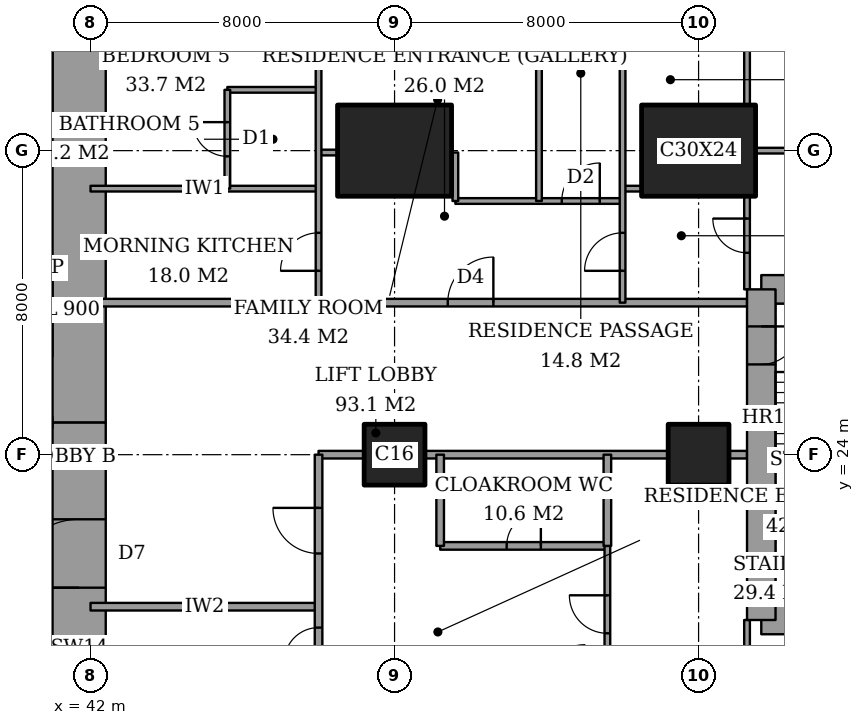
"""IFC4 building model, lengths in metres.
Left out: names, types, materials, properties, quantities, classifications, styles, units other than length and angle.
Written with IfcOpenShell. Run it as: python <this file> out.ifc"""

import sys

from ifc_helpers import new_model, si_unit, direction, frame, frame_2d, origin, origin_2d, place, context, subcontext, project, spatial, rectangle, extrude, element, fill, save


model = new_model("IFC4")
c1 = context("Model", 3, precision=1e-05, world=origin(), true_north=direction((0.0, 1.0)))
c2 = subcontext(c1, "Body", "Model", "MODEL_VIEW")
j1 = project(units=[si_unit("LENGTHUNIT", "METRE"), si_unit("PLANEANGLEUNIT", "RADIAN")], contexts=[c1])
p1 = place(None, origin())
s1 = spatial("IfcSite", under=j1, at=p1, CompositionType="ELEMENT")
p2 = place(p1, origin())
s2 = spatial("IfcBuilding", under=s1, at=p2, CompositionType="ELEMENT")
p3 = place(p2, frame((0.0, 0.0, 255.6)))
s3 = spatial("IfcBuildingStorey", under=s2, at=p3, CompositionType="ELEMENT", Elevation=255.6)
p4 = place(p3, frame((50.0, 24.0, 0.0), z_axis=(0.0, 0.0, 1.0), x_axis=(1.0, 0.0, 0.0)))
e1 = element("IfcColumn", 1, at=p4, inside=s3, PredefinedType="COLUMN", context=c2, shape_type="SweptSolid", body=[
    extrude(rectangle(XDim=1.6, YDim=1.6, at=origin_2d()), origin(), (0.0, 0.0, 1.0), 3.6),
])
p5 = place(p3, frame((50.0, 32.0, 0.0), z_axis=(0.0, 0.0, 1.0), x_axis=(1.0, 0.0, 0.0)))
e2 = element("IfcColumn", 2, at=p5, inside=s3, PredefinedType="COLUMN", context=c2, shape_type="SweptSolid", body=[
    extrude(rectangle(XDim=3.0, YDim=2.4, at=origin_2d()), origin(), (0.0, 0.0, 1.0), 3.6),
])
p6 = place(p3, frame((58.0, 24.0, 0.0), z_axis=(0.0, 0.0, 1.0), x_axis=(1.0, 0.0, 0.0)))
e3 = element("IfcColumn", 3, at=p6, inside=s3, PredefinedType="COLUMN", context=c2, shape_type="SweptSolid", body=[
    extrude(rectangle(XDim=1.6, YDim=1.6, at=origin_2d()), origin(), (0.0, 0.0, 1.0), 3.6),
])
p7 = place(p3, frame((58.0, 32.0, 0.0), z_axis=(0.0, 0.0, 1.0), x_axis=(1.0, 0.0, 0.0)))
e4 = element("IfcColumn", 4, at=p7, inside=s3, PredefinedType="COLUMN", context=c2, shape_type="SweptSolid", body=[
    extrude(rectangle(XDim=3.0, YDim=2.4, at=origin_2d()), origin(), (0.0, 0.0, 1.0), 3.6),
])
p8 = place(p3, frame((41.7, 13.0, 0.0), z_axis=(0.0, 0.0, 1.0), x_axis=(0.0, 1.0, 0.0)))
e5 = element("IfcWall", 5, at=p8, inside=s3, PredefinedType="SHEAR", context=c2, shape_type="SweptSolid", body=[
    extrude(rectangle(XDim=11.85, YDim=1.4, at=frame_2d((5.925, 0.0))), origin(), (0.0, 0.0, 1.0), 3.6),
])
p9 = place(p8, frame((7.5, 0.0, 0.0)))
e6 = element("IfcOpeningElement", 6, at=p9, cuts=e5, PredefinedType="OPENING", context=c2, shape_type="SweptSolid", body=[
    extrude(rectangle(XDim=1.8, YDim=2.4, at=frame_2d((0.9, 1.2))), frame((0.0, 0.71, 0.0), z_axis=(0.0, -1.0, 0.0), x_axis=(1.0, 0.0, 0.0)), (0.0, 0.0, 1.0), 1.42),
])
p10 = place(p3, frame((41.7, 24.85, 0.0), z_axis=(0.0, 0.0, 1.0), x_axis=(0.0, 1.0, 0.0)))
e7 = element("IfcWall", 7, at=p10, inside=s3, PredefinedType="SHEAR", context=c2, shape_type="SweptSolid", body=[
    extrude(rectangle(XDim=10.15, YDim=1.4, at=frame_2d((5.075, 0.0))), origin(), (0.0, 0.0, 1.0), 3.6),
])
for number, where, z_axis, x_axis in (
    (8, (59.65, 19.65, 0.0), (0.0, 0.0, 1.0), (1.0, 0.0, 0.0)),
    (9, (64.1, 28.35, 0.0), (0.0, 0.0, 1.0), (-1.0, 0.0, 0.0)),
):
    element("IfcWall", number, at=place(p3, frame(where, z_axis=z_axis, x_axis=x_axis)), inside=s3, PredefinedType="SHEAR", context=c2, shape_type="SweptSolid", body=[
        extrude(rectangle(XDim=4.45, YDim=0.75, at=frame_2d((2.225, 0.0))), origin(), (0.0, 0.0, 1.0), 3.6),
    ])
p11 = place(p3, frame((59.65, 28.35, 0.0), z_axis=(0.0, 0.0, 1.0), x_axis=(0.0, -1.0, 0.0)))
e10 = element("IfcWall", 10, at=p11, inside=s3, PredefinedType="SHEAR", context=c2, shape_type="SweptSolid", body=[
    extrude(rectangle(XDim=8.7, YDim=0.75, at=frame_2d((4.35, 0.0))), origin(), (0.0, 0.0, 1.0), 3.6),
])
p12 = place(p11, frame((0.975, 0.0, 0.0)))
e11 = element("IfcOpeningElement", 11, at=p12, cuts=e10, PredefinedType="OPENING", context=c2, shape_type="SweptSolid", body=[
    extrude(rectangle(XDim=1.0, YDim=2.1, at=frame_2d((0.5, 1.05))), frame((0.0, 0.385, 0.0), z_axis=(0.0, -1.0, 0.0), x_axis=(1.0, 0.0, 0.0)), (0.0, 0.0, 1.0), 0.77),
])
p13 = place(p3, frame((42.0, 20.0, 0.0), z_axis=(0.0, 0.0, 1.0), x_axis=(1.0, 0.0, 0.0)))
e12 = element("IfcWall", 12, at=p13, inside=s3, PredefinedType="PARTITIONING", context=c2, shape_type="SweptSolid", body=[
    extrude(rectangle(XDim=6.0, YDim=0.2, at=frame_2d((3.0, 0.0))), origin(), (0.0, 0.0, 1.0), 3.35),
])
p14 = place(p3, frame((51.2, 21.6, 0.0), z_axis=(0.0, 0.0, 1.0), x_axis=(1.0, 0.0, 0.0)))
e13 = element("IfcWall", 13, at=p14, inside=s3, PredefinedType="PARTITIONING", context=c2, shape_type="SweptSolid", body=[
    extrude(rectangle(XDim=4.4, YDim=0.2, at=frame_2d((2.2, 0.0))), origin(), (0.0, 0.0, 1.0), 3.35),
])
p15 = place(p14, frame((1.75, 0.0, 0.0)))
e14 = element("IfcOpeningElement", 14, at=p15, cuts=e13, PredefinedType="OPENING", context=c2, shape_type="SweptSolid", body=[
    extrude(rectangle(XDim=0.9, YDim=2.1, at=frame_2d((0.45, 1.05))), frame((0.0, 0.11, 0.0), z_axis=(0.0, -1.0, 0.0), x_axis=(1.0, 0.0, 0.0)), (0.0, 0.0, 1.0), 0.22),
])
p16 = place(p3, frame((48.0, 24.0, 0.0), z_axis=(0.0, 0.0, 1.0), x_axis=(1.0, 0.0, 0.0)))
e15 = element("IfcWall", 15, at=p16, inside=s3, PredefinedType="PARTITIONING", context=c2, shape_type="SweptSolid", body=[
    extrude(rectangle(XDim=1.2, YDim=0.2, at=frame_2d((0.6, 0.0))), origin(), (0.0, 0.0, 1.0), 3.35),
])
p17 = place(p3, frame((50.8, 24.0, 0.0), z_axis=(0.0, 0.0, 1.0), x_axis=(1.0, 0.0, 0.0)))
e16 = element("IfcWall", 16, at=p17, inside=s3, PredefinedType="PARTITIONING", context=c2, shape_type="SweptSolid", body=[
    extrude(rectangle(XDim=6.4, YDim=0.2, at=frame_2d((3.2, 0.0))), origin(), (0.0, 0.0, 1.0), 3.35),
])
p18 = place(p3, frame((58.8, 24.0, 0.0), z_axis=(0.0, 0.0, 1.0), x_axis=(1.0, 0.0, 0.0)))
e17 = element("IfcWall", 17, at=p18, inside=s3, PredefinedType="PARTITIONING", context=c2, shape_type="SweptSolid", body=[
    extrude(rectangle(XDim=0.475, YDim=0.2, at=frame_2d((0.237, 0.0))), origin(), (0.0, 0.0, 1.0), 3.35),
])
p19 = place(p3, frame((42.0, 28.0, 0.0), z_axis=(0.0, 0.0, 1.0), x_axis=(1.0, 0.0, 0.0)))
e18 = element("IfcWall", 18, at=p19, inside=s3, PredefinedType="PARTITIONING", context=c2, shape_type="SweptSolid", body=[
    extrude(rectangle(XDim=17.275, YDim=0.2, at=frame_2d((8.637, 0.0))), origin(), (0.0, 0.0, 1.0), 3.35),
])
p20 = place(p19, frame((9.4, 0.0, 0.0)))
e19 = element("IfcOpeningElement", 19, at=p20, cuts=e18, PredefinedType="OPENING", context=c2, shape_type="SweptSolid", body=[
    extrude(rectangle(XDim=1.2, YDim=2.4, at=frame_2d((0.6, 1.2))), frame((0.0, 0.11, 0.0), z_axis=(0.0, -1.0, 0.0), x_axis=(1.0, 0.0, 0.0)), (0.0, 0.0, 1.0), 0.22),
])
p21 = place(p3, frame((51.6, 30.675, 0.0), z_axis=(0.0, 0.0, 1.0), x_axis=(1.0, 0.0, 0.0)))
e20 = element("IfcWall", 20, at=p21, inside=s3, PredefinedType="PARTITIONING", context=c2, shape_type="SweptSolid", body=[
    extrude(rectangle(XDim=4.4, YDim=0.15, at=frame_2d((2.2, 0.0))), origin(), (0.0, 0.0, 1.0), 3.35),
])
p22 = place(p21, frame((2.8, 0.0, 0.0)))
e21 = element("IfcOpeningElement", 21, at=p22, cuts=e20, PredefinedType="OPENING", context=c2, shape_type="SweptSolid", body=[
    extrude(rectangle(XDim=1.0, YDim=2.1, at=frame_2d((0.5, 1.05))), frame((0.0, 0.085, 0.0), z_axis=(0.0, -1.0, 0.0), x_axis=(1.0, 0.0, 0.0)), (0.0, 0.0, 1.0), 0.17),
])
p23 = place(p3, frame((42.0, 31.0, 0.0), z_axis=(0.0, 0.0, 1.0), x_axis=(1.0, 0.0, 0.0)))
e22 = element("IfcWall", 22, at=p23, inside=s3, PredefinedType="PARTITIONING", context=c2, shape_type="SweptSolid", body=[
    extrude(rectangle(XDim=6.0, YDim=0.15, at=frame_2d((3.0, 0.0))), origin(), (0.0, 0.0, 1.0), 3.35),
])
p24 = place(p3, frame((56.0, 31.0, 0.0), z_axis=(0.0, 0.0, 1.0), x_axis=(1.0, 0.0, 0.0)))
e23 = element("IfcWall", 23, at=p24, inside=s3, PredefinedType="PARTITIONING", context=c2, shape_type="SweptSolid", body=[
    extrude(rectangle(XDim=0.5, YDim=0.15, at=frame_2d((0.25, 0.0))), origin(), (0.0, 0.0, 1.0), 3.35),
])
p25 = place(p3, frame((48.0, 31.95, 0.0), z_axis=(0.0, 0.0, 1.0), x_axis=(1.0, 0.0, 0.0)))
e24 = element("IfcWall", 24, at=p25, inside=s3, PredefinedType="PARTITIONING", context=c2, shape_type="SweptSolid", body=[
    extrude(rectangle(XDim=0.5, YDim=0.15, at=frame_2d((0.25, 0.0))), origin(), (0.0, 0.0, 1.0), 2.634),
])
p26 = place(p3, frame((59.5, 32.0, 0.0), z_axis=(0.0, 0.0, 1.0), x_axis=(1.0, 0.0, 0.0)))
e25 = element("IfcWall", 25, at=p26, inside=s3, PredefinedType="PARTITIONING", context=c2, shape_type="SweptSolid", body=[
    extrude(rectangle(XDim=5.35, YDim=0.15, at=frame_2d((2.675, 0.0))), origin(), (0.0, 0.0, 1.0), 2.634),
])
p27 = place(p3, frame((45.6, 33.6, 0.0), z_axis=(0.0, 0.0, 1.0), x_axis=(1.0, 0.0, 0.0)))
e26 = element("IfcWall", 26, at=p27, inside=s3, PredefinedType="PARTITIONING", context=c2, shape_type="SweptSolid", body=[
    extrude(rectangle(XDim=2.4, YDim=0.15, at=frame_2d((1.2, 0.0))), origin(), (0.0, 0.0, 1.0), 3.35),
])
p28 = place(p3, frame((45.6, 31.0, 0.0), z_axis=(0.0, 0.0, 1.0), x_axis=(0.0, 1.0, 0.0)))
e27 = element("IfcWall", 27, at=p28, inside=s3, PredefinedType="PARTITIONING", context=c2, shape_type="SweptSolid", body=[
    extrude(rectangle(XDim=2.6, YDim=0.15, at=frame_2d((1.3, 0.0))), origin(), (0.0, 0.0, 1.0), 3.35),
])
p29 = place(p28, frame((0.85, 0.0, 0.0)))
e28 = element("IfcOpeningElement", 28, at=p29, cuts=e27, PredefinedType="OPENING", context=c2, shape_type="SweptSolid", body=[
    extrude(rectangle(XDim=0.9, YDim=2.1, at=frame_2d((0.45, 1.05))), frame((0.0, 0.085, 0.0), z_axis=(0.0, -1.0, 0.0), x_axis=(1.0, 0.0, 0.0)), (0.0, 0.0, 1.0), 0.17),
])
p30 = place(p3, frame((48.0, 18.0, 0.0), z_axis=(0.0, 0.0, 1.0), x_axis=(0.0, 1.0, 0.0)))
e29 = element("IfcWall", 29, at=p30, inside=s3, PredefinedType="PARTITIONING", context=c2, shape_type="SweptSolid", body=[
    extrude(rectangle(XDim=6.0, YDim=0.2, at=frame_2d((3.0, 0.0))), origin(), (0.0, 0.0, 1.0), 3.35),
])
p31 = place(p30, frame((3.4, 0.0, 0.0)))
e30 = element("IfcOpeningElement", 30, at=p31, cuts=e29, PredefinedType="OPENING", context=c2, shape_type="SweptSolid", body=[
    extrude(rectangle(XDim=1.2, YDim=2.4, at=frame_2d((0.6, 1.2))), frame((0.0, 0.11, 0.0), z_axis=(0.0, -1.0, 0.0), x_axis=(1.0, 0.0, 0.0)), (0.0, 0.0, 1.0), 0.22),
])
p32 = place(p30, frame((0.55, 0.0, 0.0)))
e31 = element("IfcOpeningElement", 31, at=p32, cuts=e29, PredefinedType="OPENING", context=c2, shape_type="SweptSolid", body=[
    extrude(rectangle(XDim=0.9, YDim=2.1, at=frame_2d((0.45, 1.05))), frame((0.0, 0.11, 0.0), z_axis=(0.0, -1.0, 0.0), x_axis=(1.0, 0.0, 0.0)), (0.0, 0.0, 1.0), 0.22),
])
p33 = place(p3, frame((48.0, 28.0, 0.0), z_axis=(0.0, 0.0, 1.0), x_axis=(0.0, 1.0, 0.0)))
e32 = element("IfcWall", 32, at=p33, inside=s3, PredefinedType="PARTITIONING", context=c2, shape_type="SweptSolid", body=[
    extrude(rectangle(XDim=9.4, YDim=0.15, at=frame_2d((4.7, 0.0))), origin(), (0.0, 0.0, 1.0), 3.35),
])
p34 = place(p33, frame((0.837, 0.0, 0.0)))
e33 = element("IfcOpeningElement", 33, at=p34, cuts=e32, PredefinedType="OPENING", context=c2, shape_type="SweptSolid", body=[
    extrude(rectangle(XDim=1.0, YDim=2.1, at=frame_2d((0.5, 1.05))), frame((0.0, 0.085, 0.0), z_axis=(0.0, -1.0, 0.0), x_axis=(1.0, 0.0, 0.0)), (0.0, 0.0, 1.0), 0.17),
])
p35 = place(p3, frame((51.2, 21.6, 0.0), z_axis=(0.0, 0.0, 1.0), x_axis=(0.0, 1.0, 0.0)))
e34 = element("IfcWall", 34, at=p35, inside=s3, PredefinedType="PARTITIONING", context=c2, shape_type="SweptSolid", body=[
    extrude(rectangle(XDim=2.4, YDim=0.2, at=frame_2d((1.2, 0.0))), origin(), (0.0, 0.0, 1.0), 3.35),
])
p36 = place(p3, frame((51.6, 30.675, 0.0), z_axis=(0.0, 0.0, 1.0), x_axis=(0.0, 1.0, 0.0)))
e35 = element("IfcWall", 35, at=p36, inside=s3, PredefinedType="PARTITIONING", context=c2, shape_type="SweptSolid", body=[
    extrude(rectangle(XDim=1.275, YDim=0.15, at=frame_2d((0.637, 0.0))), origin(), (0.0, 0.0, 1.0), 3.35),
])
p37 = place(p3, frame((53.8, 30.675, 0.0), z_axis=(0.0, 0.0, 1.0), x_axis=(0.0, 1.0, 0.0)))
e36 = element("IfcWall", 36, at=p37, inside=s3, PredefinedType="PARTITIONING", context=c2, shape_type="SweptSolid", body=[
    extrude(rectangle(XDim=6.725, YDim=0.15, at=frame_2d((3.362, 0.0))), origin(), (0.0, 0.0, 1.0), 3.35),
])
p38 = place(p3, frame((55.6, 21.6, 0.0), z_axis=(0.0, 0.0, 1.0), x_axis=(0.0, 1.0, 0.0)))
e37 = element("IfcWall", 37, at=p38, inside=s3, PredefinedType="PARTITIONING", context=c2, shape_type="SweptSolid", body=[
    extrude(rectangle(XDim=2.4, YDim=0.2, at=frame_2d((1.2, 0.0))), origin(), (0.0, 0.0, 1.0), 3.35),
])
p39 = place(p3, frame((55.6, 14.6, 0.0), z_axis=(0.0, 0.0, 1.0), x_axis=(0.0, 1.0, 0.0)))
e38 = element("IfcWall", 38, at=p39, inside=s3, PredefinedType="PARTITIONING", context=c2, shape_type="SweptSolid", body=[
    extrude(rectangle(XDim=7.0, YDim=0.15, at=frame_2d((3.5, 0.0))), origin(), (0.0, 0.0, 1.0), 3.35),
])
p40 = place(p39, frame((4.7, 0.0, 0.0)))
e39 = element("IfcOpeningElement", 39, at=p40, cuts=e38, PredefinedType="OPENING", context=c2, shape_type="SweptSolid", body=[
    extrude(rectangle(XDim=1.0, YDim=2.1, at=frame_2d((0.5, 1.05))), frame((0.0, 0.085, 0.0), z_axis=(0.0, -1.0, 0.0), x_axis=(1.0, 0.0, 0.0)), (0.0, 0.0, 1.0), 0.17),
])
p41 = place(p3, frame((56.0, 28.0, 0.0), z_axis=(0.0, 0.0, 1.0), x_axis=(0.0, 1.0, 0.0)))
e40 = element("IfcWall", 40, at=p41, inside=s3, PredefinedType="PARTITIONING", context=c2, shape_type="SweptSolid", body=[
    extrude(rectangle(XDim=9.4, YDim=0.15, at=frame_2d((4.7, 0.0))), origin(), (0.0, 0.0, 1.0), 3.35),
])
p42 = place(p41, frame((0.837, 0.0, 0.0)))
e41 = element("IfcOpeningElement", 41, at=p42, cuts=e40, PredefinedType="OPENING", context=c2, shape_type="SweptSolid", body=[
    extrude(rectangle(XDim=1.0, YDim=2.1, at=frame_2d((0.5, 1.05))), frame((0.0, 0.085, 0.0), z_axis=(0.0, -1.0, 0.0), x_axis=(1.0, 0.0, 0.0)), (0.0, 0.0, 1.0), 0.17),
])
p43 = place(p3, frame((59.275, 17.2, 0.0), z_axis=(0.0, 0.0, 1.0), x_axis=(0.0, 1.0, 0.0)))
e42 = element("IfcWall", 42, at=p43, inside=s3, PredefinedType="PARTITIONING", context=c2, shape_type="SweptSolid", body=[
    extrude(rectangle(XDim=2.45, YDim=0.15, at=frame_2d((1.225, 0.0))), origin(), (0.0, 0.0, 1.0), 3.35),
])
p44 = place(p43, frame((0.538, 0.0, 0.0)))
e43 = element("IfcOpeningElement", 43, at=p44, cuts=e42, PredefinedType="OPENING", context=c2, shape_type="SweptSolid", body=[
    extrude(rectangle(XDim=1.0, YDim=2.1, at=frame_2d((0.5, 1.05))), frame((0.0, 0.085, 0.0), z_axis=(0.0, -1.0, 0.0), x_axis=(1.0, 0.0, 0.0)), (0.0, 0.0, 1.0), 0.17),
])
p45 = place(p3, frame((59.275, 28.35, 0.0), z_axis=(0.0, 0.0, 1.0), x_axis=(0.0, 1.0, 0.0)))
e44 = element("IfcWall", 44, at=p45, inside=s3, PredefinedType="PARTITIONING", context=c2, shape_type="SweptSolid", body=[
    extrude(rectangle(XDim=2.45, YDim=0.15, at=frame_2d((1.225, 0.0))), origin(), (0.0, 0.0, 1.0), 3.35),
])
p46 = place(p45, frame((0.962, 0.0, 0.0)))
e45 = element("IfcOpeningElement", 45, at=p46, cuts=e44, PredefinedType="OPENING", context=c2, shape_type="SweptSolid", body=[
    extrude(rectangle(XDim=0.9, YDim=2.1, at=frame_2d((0.45, 1.05))), frame((0.0, 0.085, 0.0), z_axis=(0.0, -1.0, 0.0), x_axis=(1.0, 0.0, 0.0)), (0.0, 0.0, 1.0), 0.17),
])
p47 = place(p3, frame((59.275, 33.2, 0.0), z_axis=(0.0, 0.0, 1.0), x_axis=(0.0, 1.0, 0.0)))
e46 = element("IfcWall", 46, at=p47, inside=s3, PredefinedType="PARTITIONING", context=c2, shape_type="SweptSolid", body=[
    extrude(rectangle(XDim=4.2, YDim=0.15, at=frame_2d((2.1, 0.0))), origin(), (0.0, 0.0, 1.0), 3.35),
])
p48 = place(p40, origin())
e47 = element("IfcDoor", 47, at=p48, inside=s3, OperationType="SINGLE_SWING_LEFT", PredefinedType="DOOR", context=c2, shape_type="SweptSolid", body=[
    extrude(rectangle(XDim=1.0, YDim=2.1, at=frame_2d((0.5, 1.05))), frame((0.0, 0.025, 0.0), z_axis=(0.0, -1.0, 0.0), x_axis=(1.0, 0.0, 0.0)), (0.0, 0.0, 1.0), 0.05),
])
fill(e39, e47)
p49 = place(p15, origin())
e48 = element("IfcDoor", 48, at=p49, inside=s3, OperationType="SINGLE_SWING_LEFT", PredefinedType="DOOR", context=c2, shape_type="SweptSolid", body=[
    extrude(rectangle(XDim=0.9, YDim=2.1, at=frame_2d((0.45, 1.05))), frame((0.0, 0.025, 0.0), z_axis=(0.0, -1.0, 0.0), x_axis=(1.0, 0.0, 0.0)), (0.0, 0.0, 1.0), 0.05),
])
fill(e14, e48)
p50 = place(p31, origin())
e49 = element("IfcDoor", 49, at=p50, inside=s3, OperationType="SINGLE_SWING_LEFT", PredefinedType="DOOR", context=c2, shape_type="SweptSolid", body=[
    extrude(rectangle(XDim=1.2, YDim=2.4, at=frame_2d((0.6, 1.2))), frame((0.0, 0.025, 0.0), z_axis=(0.0, -1.0, 0.0), x_axis=(1.0, 0.0, 0.0)), (0.0, 0.0, 1.0), 0.05),
])
fill(e30, e49)
p51 = place(p32, origin())
e50 = element("IfcDoor", 50, at=p51, inside=s3, OperationType="SINGLE_SWING_RIGHT", PredefinedType="DOOR", context=c2, shape_type="SweptSolid", body=[
    extrude(rectangle(XDim=0.9, YDim=2.1, at=frame_2d((0.45, 1.05))), frame((0.0, 0.025, 0.0), z_axis=(0.0, -1.0, 0.0), x_axis=(1.0, 0.0, 0.0)), (0.0, 0.0, 1.0), 0.05),
])
fill(e31, e50)
p52 = place(p46, origin())
e51 = element("IfcDoor", 51, at=p52, inside=s3, OperationType="SINGLE_SWING_LEFT", PredefinedType="DOOR", context=c2, shape_type="SweptSolid", body=[
    extrude(rectangle(XDim=0.9, YDim=2.1, at=frame_2d((0.45, 1.05))), frame((0.0, 0.025, 0.0), z_axis=(0.0, -1.0, 0.0), x_axis=(1.0, 0.0, 0.0)), (0.0, 0.0, 1.0), 0.05),
])
fill(e45, e51)
p53 = place(p42, origin())
e52 = element("IfcDoor", 52, at=p53, inside=s3, OperationType="SINGLE_SWING_RIGHT", PredefinedType="DOOR", context=c2, shape_type="SweptSolid", body=[
    extrude(rectangle(XDim=1.0, YDim=2.1, at=frame_2d((0.5, 1.05))), frame((0.0, 0.025, 0.0), z_axis=(0.0, -1.0, 0.0), x_axis=(1.0, 0.0, 0.0)), (0.0, 0.0, 1.0), 0.05),
])
fill(e41, e52)
p54 = place(p20, origin())
e53 = element("IfcDoor", 53, at=p54, inside=s3, OperationType="SINGLE_SWING_LEFT", PredefinedType="DOOR", context=c2, shape_type="SweptSolid", body=[
    extrude(rectangle(XDim=1.2, YDim=2.4, at=frame_2d((0.6, 1.2))), frame((0.0, 0.025, 0.0), z_axis=(0.0, -1.0, 0.0), x_axis=(1.0, 0.0, 0.0)), (0.0, 0.0, 1.0), 0.05),
])
fill(e19, e53)
p55 = place(p22, origin())
e54 = element("IfcDoor", 54, at=p55, inside=s3, OperationType="SINGLE_SWING_LEFT", PredefinedType="DOOR", context=c2, shape_type="SweptSolid", body=[
    extrude(rectangle(XDim=1.0, YDim=2.1, at=frame_2d((0.5, 1.05))), frame((0.0, 0.025, 0.0), z_axis=(0.0, -1.0, 0.0), x_axis=(1.0, 0.0, 0.0)), (0.0, 0.0, 1.0), 0.05),
])
fill(e21, e54)
p56 = place(p29, origin())
e55 = element("IfcDoor", 55, at=p56, inside=s3, OperationType="SINGLE_SWING_LEFT", PredefinedType="DOOR", context=c2, shape_type="SweptSolid", body=[
    extrude(rectangle(XDim=0.9, YDim=2.1, at=frame_2d((0.45, 1.05))), frame((0.0, 0.025, 0.0), z_axis=(0.0, -1.0, 0.0), x_axis=(1.0, 0.0, 0.0)), (0.0, 0.0, 1.0), 0.05),
])
fill(e28, e55)
p57 = place(p34, origin())
e56 = element("IfcDoor", 56, at=p57, inside=s3, OperationType="SINGLE_SWING_RIGHT", PredefinedType="DOOR", context=c2, shape_type="SweptSolid", body=[
    extrude(rectangle(XDim=1.0, YDim=2.1, at=frame_2d((0.5, 1.05))), frame((0.0, 0.025, 0.0), z_axis=(0.0, -1.0, 0.0), x_axis=(1.0, 0.0, 0.0)), (0.0, 0.0, 1.0), 0.05),
])
fill(e33, e56)
p58 = place(p9, origin())
e57 = element("IfcDoor", 57, at=p58, inside=s3, OperationType="DOUBLE_DOOR_DOUBLE_SWING", PredefinedType="DOOR", context=c2, shape_type="SweptSolid", body=[
    extrude(rectangle(XDim=1.8, YDim=2.4, at=frame_2d((0.9, 1.2))), frame((0.0, 0.025, 0.0), z_axis=(0.0, -1.0, 0.0), x_axis=(1.0, 0.0, 0.0)), (0.0, 0.0, 1.0), 0.05),
])
fill(e6, e57)
p59 = place(p12, origin())
e58 = element("IfcDoor", 58, at=p59, inside=s3, OperationType="SINGLE_SWING_RIGHT", PredefinedType="DOOR", context=c2, shape_type="SweptSolid", body=[
    extrude(rectangle(XDim=1.0, YDim=2.1, at=frame_2d((0.5, 1.05))), frame((0.0, 0.025, 0.0), z_axis=(0.0, -1.0, 0.0), x_axis=(1.0, 0.0, 0.0)), (0.0, 0.0, 1.0), 0.05),
])
fill(e11, e58)
save(model, sys.argv[1])
